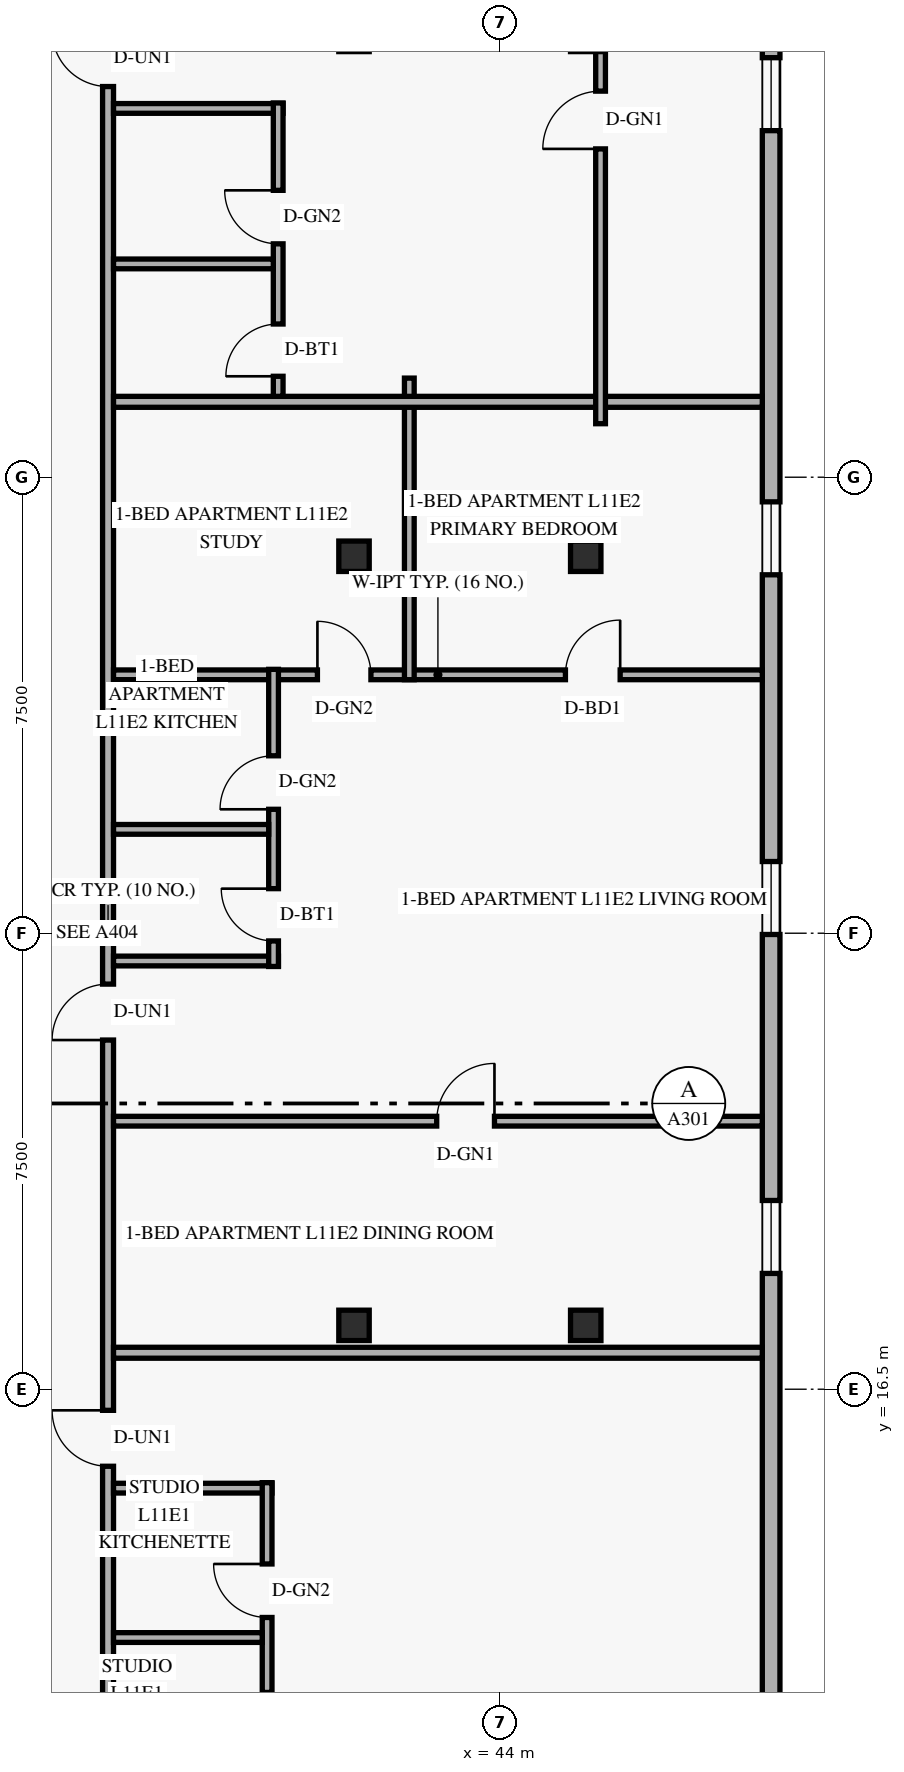
"""IFC4 building model, lengths in metres.
Left out: names, types, materials, properties, quantities, classifications, styles, units other than length and angle.
Written with IfcOpenShell. Run it as: python <this file> out.ifc"""

import sys

from ifc_helpers import new_model, si_unit, direction, frame, frame_2d, origin, origin_2d, place, context, subcontext, project, spatial, rectangle, hollow_rectangle, extrude, element, fill, save


model = new_model("IFC4")
c1 = context("Model", 3, precision=1e-05, world=origin(), true_north=direction((0.0, 1.0)))
c2 = subcontext(c1, "Body", "Model", "MODEL_VIEW")
j1 = project(units=[si_unit("LENGTHUNIT", "METRE"), si_unit("PLANEANGLEUNIT", "RADIAN")], contexts=[c1])
p1 = place(None, origin())
s1 = spatial("IfcSite", under=j1, at=p1, CompositionType="ELEMENT")
p2 = place(p1, origin())
s2 = spatial("IfcBuilding", under=s1, at=p2, CompositionType="ELEMENT")
p3 = place(p2, frame((0.0, 0.0, 45.6)))
s3 = spatial("IfcBuildingStorey", under=s2, at=p3, CompositionType="ELEMENT", Elevation=45.6)
for number, where, z_axis, x_axis in (
    (1, (41.532, 17.55, 0.0), (0.035, 0.0, 0.999), (0.0, 1.0, 0.0)),
    (2, (41.532, 30.2, 0.0), (0.035, 0.0, 0.999), (0.0, 1.0, 0.0)),
):
    element("IfcColumn", number, at=place(p3, frame(where, z_axis=z_axis, x_axis=x_axis)), inside=s3, PredefinedType="COLUMN", context=c2, shape_type="SweptSolid", body=[
        extrude(hollow_rectangle(XDim=0.5, YDim=0.5, WallThickness=0.022, at=origin_2d()), origin(), (0.0, 0.0, 1.0), 3.602),
    ])
for number, where, z_axis, x_axis in (
    (3, (45.302, 17.55, 0.0), (0.058, 0.0, 0.998), (0.0, 1.0, 0.0)),
    (4, (45.302, 30.2, 0.0), (0.058, 0.0, 0.998), (0.0, 1.0, 0.0)),
):
    element("IfcColumn", number, at=place(p3, frame(where, z_axis=z_axis, x_axis=x_axis)), inside=s3, PredefinedType="COLUMN", context=c2, shape_type="SweptSolid", body=[
        extrude(hollow_rectangle(XDim=0.5, YDim=0.5, WallThickness=0.022, at=origin_2d()), origin(), (0.0, 0.0, 1.0), 3.606),
    ])
p4 = place(p3, frame((48.455, 4.62, 0.0), z_axis=(0.0, 0.0, 1.0), x_axis=(0.0, 1.0, 0.0)))
e5 = element("IfcWall", 5, at=p4, inside=s3, PredefinedType="SOLIDWALL", context=c2, shape_type="SweptSolid", body=[
    extrude(rectangle(XDim=38.76, YDim=0.29, at=frame_2d((19.38, 0.0))), origin(), (0.0, 0.0, 1.0), 3.36),
])
p5 = place(p4, frame((5.64, 0.0, 0.85)))
e6 = element("IfcOpeningElement", 6, at=p5, cuts=e5, PredefinedType="OPENING", context=c2, shape_type="SweptSolid", body=[
    extrude(rectangle(XDim=1.2, YDim=1.5, at=frame_2d((0.6, 0.75))), frame((0.0, 0.155, 0.0), z_axis=(0.0, -1.0, 0.0), x_axis=(1.0, 0.0, 0.0)), (0.0, 0.0, 1.0), 0.31),
])
p6 = place(p4, frame((13.784, 0.0, 0.85)))
e7 = element("IfcOpeningElement", 7, at=p6, cuts=e5, PredefinedType="OPENING", context=c2, shape_type="SweptSolid", body=[
    extrude(rectangle(XDim=1.2, YDim=1.5, at=frame_2d((0.6, 0.75))), frame((0.0, 0.155, 0.0), z_axis=(0.0, -1.0, 0.0), x_axis=(1.0, 0.0, 0.0)), (0.0, 0.0, 1.0), 0.31),
])
p7 = place(p4, frame((19.359, 0.0, 0.85)))
e8 = element("IfcOpeningElement", 8, at=p7, cuts=e5, PredefinedType="OPENING", context=c2, shape_type="SweptSolid", body=[
    extrude(rectangle(XDim=1.2, YDim=1.5, at=frame_2d((0.6, 0.75))), frame((0.0, 0.155, 0.0), z_axis=(0.0, -1.0, 0.0), x_axis=(1.0, 0.0, 0.0)), (0.0, 0.0, 1.0), 0.31),
])
p8 = place(p4, frame((25.275, 0.0, 0.85)))
e9 = element("IfcOpeningElement", 9, at=p8, cuts=e5, PredefinedType="OPENING", context=c2, shape_type="SweptSolid", body=[
    extrude(rectangle(XDim=1.2, YDim=1.5, at=frame_2d((0.6, 0.75))), frame((0.0, 0.155, 0.0), z_axis=(0.0, -1.0, 0.0), x_axis=(1.0, 0.0, 0.0)), (0.0, 0.0, 1.0), 0.31),
])
p9 = place(p4, frame((32.58, 0.0, 0.85)))
e10 = element("IfcOpeningElement", 10, at=p9, cuts=e5, PredefinedType="OPENING", context=c2, shape_type="SweptSolid", body=[
    extrude(rectangle(XDim=1.2, YDim=1.5, at=frame_2d((0.6, 0.75))), frame((0.0, 0.155, 0.0), z_axis=(0.0, -1.0, 0.0), x_axis=(1.0, 0.0, 0.0)), (0.0, 0.0, 1.0), 0.31),
])
p10 = place(p3, frame((37.55, 1.29, 0.0), z_axis=(0.0, 0.0, 1.0), x_axis=(0.0, 1.0, 0.0)))
e11 = element("IfcWall", 11, at=p10, inside=s3, PredefinedType="STANDARD", context=c2, shape_type="SweptSolid", body=[
    extrude(rectangle(XDim=45.42, YDim=0.18, at=frame_2d((22.71, 0.0))), origin(), (0.0, 0.0, 1.0), 2.649),
])
p11 = place(p10, frame((13.943, 0.0, 0.0)))
e12 = element("IfcOpeningElement", 12, at=p11, cuts=e11, PredefinedType="OPENING", context=c2, shape_type="SweptSolid", body=[
    extrude(rectangle(XDim=0.92, YDim=2.15, at=frame_2d((0.46, 1.075))), frame((0.0, 0.1, 0.0), z_axis=(0.0, -1.0, 0.0), x_axis=(1.0, 0.0, 0.0)), (0.0, 0.0, 1.0), 0.2),
])
p12 = place(p10, frame((20.953, 0.0, 0.0)))
e13 = element("IfcOpeningElement", 13, at=p12, cuts=e11, PredefinedType="OPENING", context=c2, shape_type="SweptSolid", body=[
    extrude(rectangle(XDim=0.92, YDim=2.15, at=frame_2d((0.46, 1.075))), frame((0.0, 0.1, 0.0), z_axis=(0.0, -1.0, 0.0), x_axis=(1.0, 0.0, 0.0)), (0.0, 0.0, 1.0), 0.2),
])
p13 = place(p10, frame((36.635, 0.0, 0.0)))
e14 = element("IfcOpeningElement", 14, at=p13, cuts=e11, PredefinedType="OPENING", context=c2, shape_type="SweptSolid", body=[
    extrude(rectangle(XDim=0.92, YDim=2.15, at=frame_2d((0.46, 1.075))), frame((0.0, 0.1, 0.0), z_axis=(0.0, -1.0, 0.0), x_axis=(1.0, 0.0, 0.0)), (0.0, 0.0, 1.0), 0.2),
])
p14 = place(p3, frame((37.64, 14.873, 0.0), z_axis=(0.0, 0.0, 1.0), x_axis=(1.0, 0.0, 0.0)))
e15 = element("IfcWall", 15, at=p14, inside=s3, PredefinedType="PLUMBINGWALL", context=c2, shape_type="SweptSolid", body=[
    extrude(rectangle(XDim=2.606, YDim=0.16, at=frame_2d((1.303, 0.0))), origin(), (0.0, 0.0, 1.0), 3.36),
])
p15 = place(p3, frame((40.166, 10.233, 0.0), z_axis=(0.0, 0.0, 1.0), x_axis=(0.0, 1.0, 0.0)))
e16 = element("IfcWall", 16, at=p15, inside=s3, PredefinedType="PLUMBINGWALL", context=c2, shape_type="SweptSolid", body=[
    extrude(rectangle(XDim=4.73, YDim=0.16, at=frame_2d((2.365, 0.0))), origin(), (0.0, 0.0, 1.0), 2.932),
])
p16 = place(p15, frame((0.42, 0.0, 0.0)))
e17 = element("IfcOpeningElement", 17, at=p16, cuts=e16, PredefinedType="OPENING", context=c2, shape_type="SweptSolid", body=[
    extrude(rectangle(XDim=0.86, YDim=2.12, at=frame_2d((0.43, 1.06))), frame((0.0, 0.09, 0.0), z_axis=(0.0, -1.0, 0.0), x_axis=(1.0, 0.0, 0.0)), (0.0, 0.0, 1.0), 0.18),
])
p17 = place(p15, frame((2.513, 0.0, 0.0)))
e18 = element("IfcOpeningElement", 18, at=p17, cuts=e16, PredefinedType="OPENING", context=c2, shape_type="SweptSolid", body=[
    extrude(rectangle(XDim=0.88, YDim=2.12, at=frame_2d((0.44, 1.06))), frame((0.0, 0.09, 0.0), z_axis=(0.0, -1.0, 0.0), x_axis=(1.0, 0.0, 0.0)), (0.0, 0.0, 1.0), 0.18),
])
p18 = place(p3, frame((37.64, 12.416, 0.0), z_axis=(0.0, 0.0, 1.0), x_axis=(1.0, 0.0, 0.0)))
e19 = element("IfcWall", 19, at=p18, inside=s3, PredefinedType="PLUMBINGWALL", context=c2, shape_type="SweptSolid", body=[
    extrude(rectangle(XDim=2.446, YDim=0.16, at=frame_2d((1.223, 0.0))), origin(), (0.0, 0.0, 1.0), 3.36),
])
p19 = place(p3, frame((37.64, 17.1, 0.0), z_axis=(0.0, 0.0, 1.0), x_axis=(1.0, 0.0, 0.0)))
e20 = element("IfcWall", 20, at=p19, inside=s3, PredefinedType="PARTITIONING", context=c2, shape_type="SweptSolid", body=[
    extrude(rectangle(XDim=10.67, YDim=0.18, at=frame_2d((5.335, 0.0))), origin(), (0.0, 0.0, 1.0), 2.649),
])
p20 = place(p3, frame((37.64, 28.25, 0.0), z_axis=(0.0, 0.0, 1.0), x_axis=(1.0, 0.0, 0.0)))
e21 = element("IfcWall", 21, at=p20, inside=s3, PredefinedType="PARTITIONING", context=c2, shape_type="SweptSolid", body=[
    extrude(rectangle(XDim=10.67, YDim=0.16, at=frame_2d((5.335, 0.0))), origin(), (0.0, 0.0, 1.0), 2.649),
])
p21 = place(p20, frame((3.353, 0.0, 0.0)))
e22 = element("IfcOpeningElement", 22, at=p21, cuts=e21, PredefinedType="OPENING", context=c2, shape_type="SweptSolid", body=[
    extrude(rectangle(XDim=0.88, YDim=2.12, at=frame_2d((0.44, 1.06))), frame((0.0, 0.09, 0.0), z_axis=(0.0, -1.0, 0.0), x_axis=(1.0, 0.0, 0.0)), (0.0, 0.0, 1.0), 0.18),
])
p22 = place(p20, frame((7.432, 0.0, 0.0)))
e23 = element("IfcOpeningElement", 23, at=p22, cuts=e21, PredefinedType="OPENING", context=c2, shape_type="SweptSolid", body=[
    extrude(rectangle(XDim=0.9, YDim=2.14, at=frame_2d((0.45, 1.07))), frame((0.0, 0.09, 0.0), z_axis=(0.0, -1.0, 0.0), x_axis=(1.0, 0.0, 0.0)), (0.0, 0.0, 1.0), 0.18),
])
p23 = place(p3, frame((37.64, 23.543, 0.0), z_axis=(0.0, 0.0, 1.0), x_axis=(1.0, 0.0, 0.0)))
e24 = element("IfcWall", 24, at=p23, inside=s3, PredefinedType="PLUMBINGWALL", context=c2, shape_type="SweptSolid", body=[
    extrude(rectangle(XDim=2.712, YDim=0.16, at=frame_2d((1.356, 0.0))), origin(), (0.0, 0.0, 1.0), 3.36),
])
p24 = place(p3, frame((40.272, 23.453, 0.0), z_axis=(0.0, 0.0, 1.0), x_axis=(0.0, 1.0, 0.0)))
e25 = element("IfcWall", 25, at=p24, inside=s3, PredefinedType="PLUMBINGWALL", context=c2, shape_type="SweptSolid", body=[
    extrude(rectangle(XDim=4.887, YDim=0.16, at=frame_2d((2.444, 0.0))), origin(), (0.0, 0.0, 1.0), 3.36),
])
p25 = place(p24, frame((0.42, 0.0, 0.0)))
e26 = element("IfcOpeningElement", 26, at=p25, cuts=e25, PredefinedType="OPENING", context=c2, shape_type="SweptSolid", body=[
    extrude(rectangle(XDim=0.86, YDim=2.12, at=frame_2d((0.43, 1.06))), frame((0.0, 0.09, 0.0), z_axis=(0.0, -1.0, 0.0), x_axis=(1.0, 0.0, 0.0)), (0.0, 0.0, 1.0), 0.18),
])
p26 = place(p24, frame((2.585, 0.0, 0.0)))
e27 = element("IfcOpeningElement", 27, at=p26, cuts=e25, PredefinedType="OPENING", context=c2, shape_type="SweptSolid", body=[
    extrude(rectangle(XDim=0.88, YDim=2.12, at=frame_2d((0.44, 1.06))), frame((0.0, 0.09, 0.0), z_axis=(0.0, -1.0, 0.0), x_axis=(1.0, 0.0, 0.0)), (0.0, 0.0, 1.0), 0.18),
])
p27 = place(p3, frame((37.64, 25.708, 0.0), z_axis=(0.0, 0.0, 1.0), x_axis=(1.0, 0.0, 0.0)))
e28 = element("IfcWall", 28, at=p27, inside=s3, PredefinedType="PLUMBINGWALL", context=c2, shape_type="SweptSolid", body=[
    extrude(rectangle(XDim=2.552, YDim=0.16, at=frame_2d((1.276, 0.0))), origin(), (0.0, 0.0, 1.0), 3.36),
])
p28 = place(p3, frame((37.64, 20.908, 0.0), z_axis=(0.0, 0.0, 1.0), x_axis=(1.0, 0.0, 0.0)))
e29 = element("IfcWall", 29, at=p28, inside=s3, PredefinedType="PARTITIONING", context=c2, shape_type="SweptSolid", body=[
    extrude(rectangle(XDim=10.67, YDim=0.16, at=frame_2d((5.335, 0.0))), origin(), (0.0, 0.0, 1.0), 2.649),
])
p29 = place(p28, frame((5.315, 0.0, 0.0)))
e30 = element("IfcOpeningElement", 30, at=p29, cuts=e29, PredefinedType="OPENING", context=c2, shape_type="SweptSolid", body=[
    extrude(rectangle(XDim=0.95, YDim=2.15, at=frame_2d((0.475, 1.075))), frame((0.0, 0.09, 0.0), z_axis=(0.0, -1.0, 0.0), x_axis=(1.0, 0.0, 0.0)), (0.0, 0.0, 1.0), 0.18),
])
p30 = place(p3, frame((42.504, 28.17, 0.0), z_axis=(0.0, 0.0, 1.0), x_axis=(0.0, 1.0, 0.0)))
e31 = element("IfcWall", 31, at=p30, inside=s3, PredefinedType="PARTITIONING", context=c2, shape_type="SweptSolid", body=[
    extrude(rectangle(XDim=4.96, YDim=0.16, at=frame_2d((2.48, 0.0))), origin(), (0.0, 0.0, 1.0), 2.649),
])
p31 = place(p3, frame((37.64, 32.74, 0.0), z_axis=(0.0, 0.0, 1.0), x_axis=(1.0, 0.0, 0.0)))
e32 = element("IfcWall", 32, at=p31, inside=s3, PredefinedType="PARTITIONING", context=c2, shape_type="SweptSolid", body=[
    extrude(rectangle(XDim=10.67, YDim=0.18, at=frame_2d((5.335, 0.0))), origin(), (0.0, 0.0, 1.0), 2.649),
])
p32 = place(p3, frame((37.64, 37.565, 0.0), z_axis=(0.0, 0.0, 1.0), x_axis=(1.0, 0.0, 0.0)))
e33 = element("IfcWall", 33, at=p32, inside=s3, PredefinedType="PLUMBINGWALL", context=c2, shape_type="SweptSolid", body=[
    extrude(rectangle(XDim=2.788, YDim=0.16, at=frame_2d((1.394, 0.0))), origin(), (0.0, 0.0, 1.0), 3.36),
])
p33 = place(p3, frame((40.348, 32.83, 0.0), z_axis=(0.0, 0.0, 1.0), x_axis=(0.0, 1.0, 0.0)))
e34 = element("IfcWall", 34, at=p33, inside=s3, PredefinedType="PLUMBINGWALL", context=c2, shape_type="SweptSolid", body=[
    extrude(rectangle(XDim=4.825, YDim=0.16, at=frame_2d((2.413, 0.0))), origin(), (0.0, 0.0, 1.0), 2.932),
])
p34 = place(p33, frame((0.33, 0.0, 0.0)))
e35 = element("IfcOpeningElement", 35, at=p34, cuts=e34, PredefinedType="OPENING", context=c2, shape_type="SweptSolid", body=[
    extrude(rectangle(XDim=0.86, YDim=2.12, at=frame_2d((0.43, 1.06))), frame((0.0, 0.09, 0.0), z_axis=(0.0, -1.0, 0.0), x_axis=(1.0, 0.0, 0.0)), (0.0, 0.0, 1.0), 0.18),
])
p35 = place(p33, frame((2.508, 0.0, 0.0)))
e36 = element("IfcOpeningElement", 36, at=p35, cuts=e34, PredefinedType="OPENING", context=c2, shape_type="SweptSolid", body=[
    extrude(rectangle(XDim=0.88, YDim=2.12, at=frame_2d((0.44, 1.06))), frame((0.0, 0.09, 0.0), z_axis=(0.0, -1.0, 0.0), x_axis=(1.0, 0.0, 0.0)), (0.0, 0.0, 1.0), 0.18),
])
p36 = place(p3, frame((37.64, 35.008, 0.0), z_axis=(0.0, 0.0, 1.0), x_axis=(1.0, 0.0, 0.0)))
e37 = element("IfcWall", 37, at=p36, inside=s3, PredefinedType="PLUMBINGWALL", context=c2, shape_type="SweptSolid", body=[
    extrude(rectangle(XDim=2.628, YDim=0.16, at=frame_2d((1.314, 0.0))), origin(), (0.0, 0.0, 1.0), 3.36),
])
p37 = place(p3, frame((45.65, 32.38, 0.0), z_axis=(0.0, 0.0, 1.0), x_axis=(0.0, 1.0, 0.0)))
e38 = element("IfcWall", 38, at=p37, inside=s3, PredefinedType="PARTITIONING", context=c2, shape_type="SweptSolid", body=[
    extrude(rectangle(XDim=10.56, YDim=0.16, at=frame_2d((5.28, 0.0))), origin(), (0.0, 0.0, 1.0), 2.809),
])
p38 = place(p37, frame((4.52, 0.0, 0.0)))
e39 = element("IfcOpeningElement", 39, at=p38, cuts=e38, PredefinedType="OPENING", context=c2, shape_type="SweptSolid", body=[
    extrude(rectangle(XDim=0.95, YDim=2.15, at=frame_2d((0.475, 1.075))), frame((0.0, 0.09, 0.0), z_axis=(0.0, -1.0, 0.0), x_axis=(1.0, 0.0, 0.0)), (0.0, 0.0, 1.0), 0.18),
])
p39 = place(p6, origin())
e40 = element("IfcWindow", 40, at=p39, inside=s3, PartitioningType="SINGLE_PANEL", PredefinedType="WINDOW", context=c2, shape_type="SweptSolid", body=[
    extrude(rectangle(XDim=1.2, YDim=1.5, at=frame_2d((0.6, 0.75))), frame((0.0, 0.03, 0.0), z_axis=(0.0, -1.0, 0.0), x_axis=(1.0, 0.0, 0.0)), (0.0, 0.0, 1.0), 0.06),
])
fill(e7, e40)
p40 = place(p7, origin())
e41 = element("IfcWindow", 41, at=p40, inside=s3, PartitioningType="SINGLE_PANEL", PredefinedType="WINDOW", context=c2, shape_type="SweptSolid", body=[
    extrude(rectangle(XDim=1.2, YDim=1.5, at=frame_2d((0.6, 0.75))), frame((0.0, 0.03, 0.0), z_axis=(0.0, -1.0, 0.0), x_axis=(1.0, 0.0, 0.0)), (0.0, 0.0, 1.0), 0.06),
])
fill(e8, e41)
p41 = place(p8, origin())
e42 = element("IfcWindow", 42, at=p41, inside=s3, PartitioningType="SINGLE_PANEL", PredefinedType="WINDOW", context=c2, shape_type="SweptSolid", body=[
    extrude(rectangle(XDim=1.2, YDim=1.5, at=frame_2d((0.6, 0.75))), frame((0.0, 0.03, 0.0), z_axis=(0.0, -1.0, 0.0), x_axis=(1.0, 0.0, 0.0)), (0.0, 0.0, 1.0), 0.06),
])
fill(e9, e42)
p42 = place(p9, origin())
e43 = element("IfcWindow", 43, at=p42, inside=s3, PartitioningType="SINGLE_PANEL", PredefinedType="WINDOW", context=c2, shape_type="SweptSolid", body=[
    extrude(rectangle(XDim=1.2, YDim=1.5, at=frame_2d((0.6, 0.75))), frame((0.0, 0.03, 0.0), z_axis=(0.0, -1.0, 0.0), x_axis=(1.0, 0.0, 0.0)), (0.0, 0.0, 1.0), 0.06),
])
fill(e10, e43)
p43 = place(p11, origin())
e44 = element("IfcDoor", 44, at=p43, inside=s3, OperationType="SINGLE_SWING_RIGHT", PredefinedType="DOOR", context=c2, shape_type="SweptSolid", body=[
    extrude(rectangle(XDim=0.92, YDim=2.15, at=frame_2d((0.46, 1.075))), frame((0.0, 0.025, 0.0), z_axis=(0.0, -1.0, 0.0), x_axis=(1.0, 0.0, 0.0)), (0.0, 0.0, 1.0), 0.05),
])
fill(e12, e44)
p44 = place(p16, origin())
e45 = element("IfcDoor", 45, at=p44, inside=s3, OperationType="SINGLE_SWING_LEFT", PredefinedType="DOOR", context=c2, shape_type="SweptSolid", body=[
    extrude(rectangle(XDim=0.86, YDim=2.12, at=frame_2d((0.43, 1.06))), frame((0.0, 0.025, 0.0), z_axis=(0.0, -1.0, 0.0), x_axis=(1.0, 0.0, 0.0)), (0.0, 0.0, 1.0), 0.05),
])
fill(e17, e45)
p45 = place(p17, origin())
e46 = element("IfcDoor", 46, at=p45, inside=s3, OperationType="SINGLE_SWING_RIGHT", PredefinedType="DOOR", context=c2, shape_type="SweptSolid", body=[
    extrude(rectangle(XDim=0.88, YDim=2.12, at=frame_2d((0.44, 1.06))), frame((0.0, 0.025, 0.0), z_axis=(0.0, -1.0, 0.0), x_axis=(1.0, 0.0, 0.0)), (0.0, 0.0, 1.0), 0.05),
])
fill(e18, e46)
p46 = place(p29, origin())
e47 = element("IfcDoor", 47, at=p46, inside=s3, OperationType="SINGLE_SWING_RIGHT", PredefinedType="DOOR", context=c2, shape_type="SweptSolid", body=[
    extrude(rectangle(XDim=0.95, YDim=2.15, at=frame_2d((0.475, 1.075))), frame((0.0, 0.025, 0.0), z_axis=(0.0, -1.0, 0.0), x_axis=(1.0, 0.0, 0.0)), (0.0, 0.0, 1.0), 0.05),
])
fill(e30, e47)
p47 = place(p12, origin())
e48 = element("IfcDoor", 48, at=p47, inside=s3, OperationType="SINGLE_SWING_LEFT", PredefinedType="DOOR", context=c2, shape_type="SweptSolid", body=[
    extrude(rectangle(XDim=0.92, YDim=2.15, at=frame_2d((0.46, 1.075))), frame((0.0, 0.025, 0.0), z_axis=(0.0, -1.0, 0.0), x_axis=(1.0, 0.0, 0.0)), (0.0, 0.0, 1.0), 0.05),
])
fill(e13, e48)
p48 = place(p25, origin())
e49 = element("IfcDoor", 49, at=p48, inside=s3, OperationType="SINGLE_SWING_RIGHT", PredefinedType="DOOR", context=c2, shape_type="SweptSolid", body=[
    extrude(rectangle(XDim=0.86, YDim=2.12, at=frame_2d((0.43, 1.06))), frame((0.0, 0.025, 0.0), z_axis=(0.0, -1.0, 0.0), x_axis=(1.0, 0.0, 0.0)), (0.0, 0.0, 1.0), 0.05),
])
fill(e26, e49)
p49 = place(p26, origin())
e50 = element("IfcDoor", 50, at=p49, inside=s3, OperationType="SINGLE_SWING_LEFT", PredefinedType="DOOR", context=c2, shape_type="SweptSolid", body=[
    extrude(rectangle(XDim=0.88, YDim=2.12, at=frame_2d((0.44, 1.06))), frame((0.0, 0.025, 0.0), z_axis=(0.0, -1.0, 0.0), x_axis=(1.0, 0.0, 0.0)), (0.0, 0.0, 1.0), 0.05),
])
fill(e27, e50)
p50 = place(p21, origin())
e51 = element("IfcDoor", 51, at=p50, inside=s3, OperationType="SINGLE_SWING_LEFT", PredefinedType="DOOR", context=c2, shape_type="SweptSolid", body=[
    extrude(rectangle(XDim=0.88, YDim=2.12, at=frame_2d((0.44, 1.06))), frame((0.0, 0.025, 0.0), z_axis=(0.0, -1.0, 0.0), x_axis=(1.0, 0.0, 0.0)), (0.0, 0.0, 1.0), 0.05),
])
fill(e22, e51)
p51 = place(p22, origin())
e52 = element("IfcDoor", 52, at=p51, inside=s3, OperationType="SINGLE_SWING_RIGHT", PredefinedType="DOOR", context=c2, shape_type="SweptSolid", body=[
    extrude(rectangle(XDim=0.9, YDim=2.14, at=frame_2d((0.45, 1.07))), frame((0.0, 0.025, 0.0), z_axis=(0.0, -1.0, 0.0), x_axis=(1.0, 0.0, 0.0)), (0.0, 0.0, 1.0), 0.05),
])
fill(e23, e52)
p52 = place(p38, origin())
e53 = element("IfcDoor", 53, at=p52, inside=s3, OperationType="SINGLE_SWING_LEFT", PredefinedType="DOOR", context=c2, shape_type="SweptSolid", body=[
    extrude(rectangle(XDim=0.95, YDim=2.15, at=frame_2d((0.475, 1.075))), frame((0.0, 0.025, 0.0), z_axis=(0.0, -1.0, 0.0), x_axis=(1.0, 0.0, 0.0)), (0.0, 0.0, 1.0), 0.05),
])
fill(e39, e53)
p53 = place(p13, origin())
e54 = element("IfcDoor", 54, at=p53, inside=s3, OperationType="SINGLE_SWING_RIGHT", PredefinedType="DOOR", context=c2, shape_type="SweptSolid", body=[
    extrude(rectangle(XDim=0.92, YDim=2.15, at=frame_2d((0.46, 1.075))), frame((0.0, 0.025, 0.0), z_axis=(0.0, -1.0, 0.0), x_axis=(1.0, 0.0, 0.0)), (0.0, 0.0, 1.0), 0.05),
])
fill(e14, e54)
p54 = place(p34, origin())
e55 = element("IfcDoor", 55, at=p54, inside=s3, OperationType="SINGLE_SWING_LEFT", PredefinedType="DOOR", context=c2, shape_type="SweptSolid", body=[
    extrude(rectangle(XDim=0.86, YDim=2.12, at=frame_2d((0.43, 1.06))), frame((0.0, 0.025, 0.0), z_axis=(0.0, -1.0, 0.0), x_axis=(1.0, 0.0, 0.0)), (0.0, 0.0, 1.0), 0.05),
])
fill(e35, e55)
p55 = place(p35, origin())
e56 = element("IfcDoor", 56, at=p55, inside=s3, OperationType="SINGLE_SWING_RIGHT", PredefinedType="DOOR", context=c2, shape_type="SweptSolid", body=[
    extrude(rectangle(XDim=0.88, YDim=2.12, at=frame_2d((0.44, 1.06))), frame((0.0, 0.025, 0.0), z_axis=(0.0, -1.0, 0.0), x_axis=(1.0, 0.0, 0.0)), (0.0, 0.0, 1.0), 0.05),
])
fill(e36, e56)
save(model, sys.argv[1])
